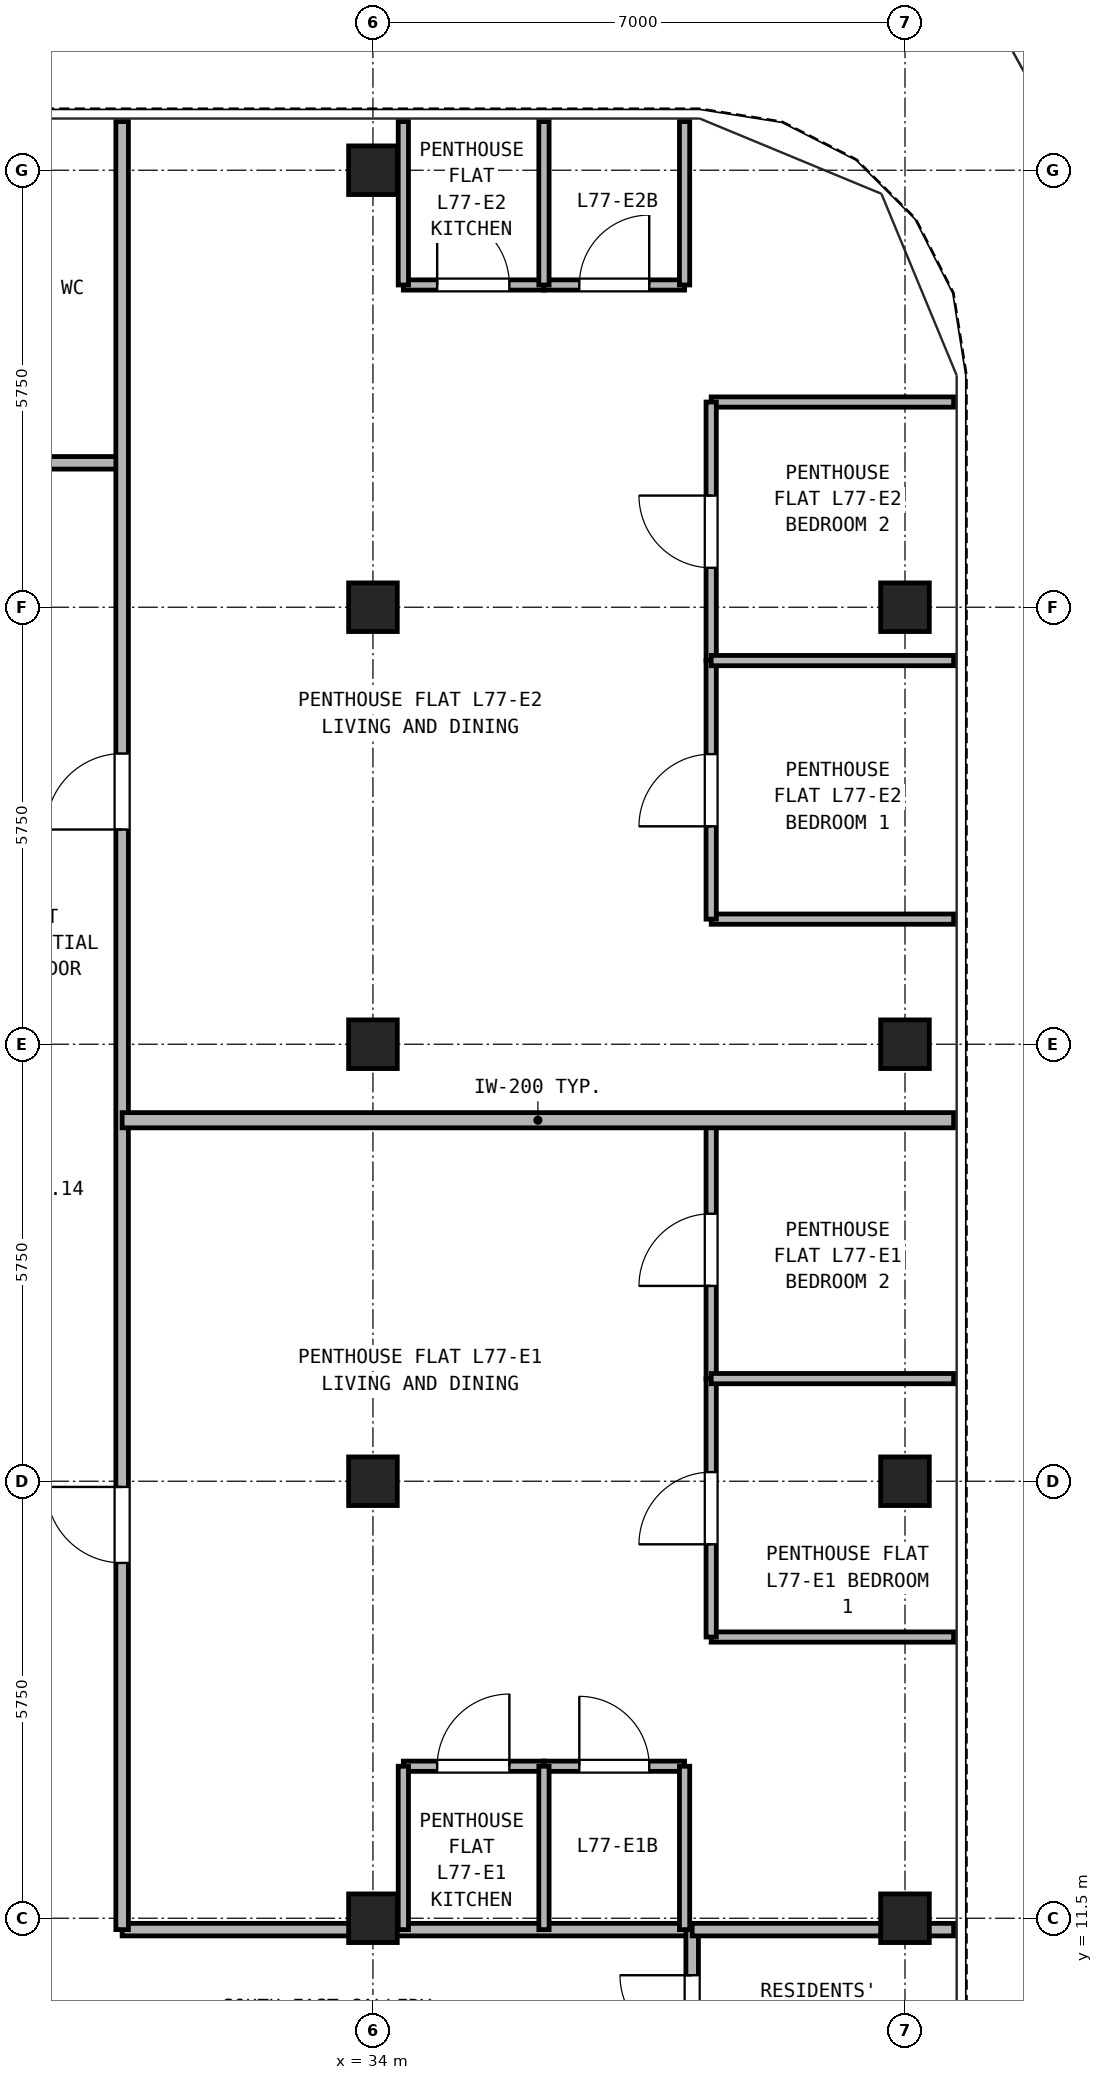
"""IFC4 building model, lengths in metres.
Left out: names, types, materials, properties, quantities, classifications, styles, units other than length and angle.
Written with IfcOpenShell. Run it as: python <this file> out.ifc"""

import sys

from ifc_helpers import new_model, si_unit, direction, frame, frame_2d, origin, origin_2d, place, context, subcontext, project, spatial, rectangle, hollow_rectangle, extrude, source, transform, mapped, element, fill, save


model = new_model("IFC4")
c1 = context("Model", 3, precision=1e-05, world=origin(), true_north=direction((0.0, 1.0)))
c2 = subcontext(c1, "Body", "Model", "MODEL_VIEW")
j1 = project(units=[si_unit("LENGTHUNIT", "METRE"), si_unit("PLANEANGLEUNIT", "RADIAN")], contexts=[c1])
p1 = place(None, origin())
s1 = spatial("IfcSite", under=j1, at=p1, CompositionType="ELEMENT")
p2 = place(p1, origin())
s2 = spatial("IfcBuilding", under=s1, at=p2, CompositionType="ELEMENT")
p3 = place(p2, frame((0.0, 0.0, 268.1)))
s3 = spatial("IfcBuildingStorey", under=s2, at=p3, CompositionType="ELEMENT", Elevation=268.1)
m1 = source(origin(), c2, "Body", "SweptSolid", [
    extrude(hollow_rectangle(XDim=0.64, YDim=0.64, WallThickness=0.035, at=origin_2d()), origin(), (0.0, 0.0, 1.0), 2.98),
])
for number, where, z_axis, x_axis in (
    (1, (34.0, 34.5, 0.0), (0.0, 0.0, 1.0), (1.0, 0.0, 0.0)),
    (2, (41.0, 11.5, 0.0), (0.0, 0.0, 1.0), (1.0, 0.0, 0.0)),
    (3, (41.0, 17.25, 0.0), (0.0, 0.0, 1.0), (1.0, 0.0, 0.0)),
    (4, (41.0, 23.0, 0.0), (0.0, 0.0, 1.0), (1.0, 0.0, 0.0)),
    (5, (41.0, 28.75, 0.0), (0.0, 0.0, 1.0), (1.0, 0.0, 0.0)),
    (6, (34.0, 11.5, 0.0), (0.0, 0.0, 1.0), (1.0, 0.0, 0.0)),
    (7, (34.0, 17.25, 0.0), (0.0, 0.0, 1.0), (1.0, 0.0, 0.0)),
    (8, (34.0, 23.0, 0.0), (0.0, 0.0, 1.0), (1.0, 0.0, 0.0)),
    (9, (34.0, 28.75, 0.0), (0.0, 0.0, 1.0), (1.0, 0.0, 0.0)),
):
    element("IfcColumn", number, at=place(p3, frame(where, z_axis=z_axis, x_axis=x_axis)), inside=s3, PredefinedType="COLUMN", context=c2, shape_type="MappedRepresentation", body=[
        mapped(m1, transform((0.0, 0.0, 0.0), x_axis=(1.0, 0.0, 0.0), y_axis=(0.0, 1.0, 0.0), z_axis=(0.0, 0.0, 1.0), scale=1.0)),
    ])
p4 = place(p3, frame((30.7, 11.35, 0.0), z_axis=(0.0, 0.0, 1.0), x_axis=(1.0, 0.0, 0.0)))
e10 = element("IfcWall", 10, at=p4, inside=s3, PredefinedType="PARTITIONING", context=c2, shape_type="SweptSolid", body=[
    extrude(rectangle(XDim=7.5, YDim=0.165, at=frame_2d((3.75, 0.0))), origin(), (0.0, 0.0, 1.0), 2.428),
])
p5 = place(p3, frame((38.2, 9.35, 0.0), z_axis=(0.0, 0.0, 1.0), x_axis=(0.0, 1.0, 0.0)))
e11 = element("IfcWall", 11, at=p5, inside=s3, PredefinedType="PARTITIONING", context=c2, shape_type="SweptSolid", body=[
    extrude(rectangle(XDim=2.0, YDim=0.165, at=frame_2d((1.0, 0.0))), origin(), (0.0, 0.0, 1.0), 2.98),
])
p6 = place(p5, frame((0.45, 0.0, 0.0)))
e12 = element("IfcOpeningElement", 12, at=p6, cuts=e11, PredefinedType="OPENING", context=c2, shape_type="SweptSolid", body=[
    extrude(rectangle(XDim=0.95, YDim=2.15, at=frame_2d((0.475, 1.075))), frame((0.0, 0.093, 0.0), z_axis=(0.0, -1.0, 0.0), x_axis=(1.0, 0.0, 0.0)), (0.0, 0.0, 1.0), 0.185),
])
p7 = place(p3, frame((16.3, 30.65, 0.0), z_axis=(0.0, 0.0, 1.0), x_axis=(1.0, 0.0, 0.0)))
e13 = element("IfcWall", 13, at=p7, inside=s3, PredefinedType="PARTITIONING", context=c2, shape_type="SweptSolid", body=[
    extrude(rectangle(XDim=14.4, YDim=0.165, at=frame_2d((7.2, 0.0))), origin(), (0.0, 0.0, 1.0), 2.98),
])
p8 = place(p7, frame((3.1, 0.0, 0.0)))
e14 = element("IfcOpeningElement", 14, at=p8, cuts=e13, PredefinedType="OPENING", context=c2, shape_type="SweptSolid", body=[
    extrude(rectangle(XDim=0.95, YDim=2.15, at=frame_2d((0.475, 1.075))), frame((0.0, 0.093, 0.0), z_axis=(0.0, -1.0, 0.0), x_axis=(1.0, 0.0, 0.0)), (0.0, 0.0, 1.0), 0.185),
])
p9 = place(p7, frame((8.0, 0.0, 0.0)))
e15 = element("IfcOpeningElement", 15, at=p9, cuts=e13, PredefinedType="OPENING", context=c2, shape_type="SweptSolid", body=[
    extrude(rectangle(XDim=0.95, YDim=2.15, at=frame_2d((0.475, 1.075))), frame((0.0, 0.093, 0.0), z_axis=(0.0, -1.0, 0.0), x_axis=(1.0, 0.0, 0.0)), (0.0, 0.0, 1.0), 0.185),
])
p10 = place(p7, frame((11.6, 0.0, 0.0)))
e16 = element("IfcOpeningElement", 16, at=p10, cuts=e13, PredefinedType="OPENING", context=c2, shape_type="SweptSolid", body=[
    extrude(rectangle(XDim=0.92, YDim=2.1, at=frame_2d((0.46, 1.05))), frame((0.0, 0.093, 0.0), z_axis=(0.0, -1.0, 0.0), x_axis=(1.0, 0.0, 0.0)), (0.0, 0.0, 1.0), 0.185),
])
p11 = place(p3, frame((30.7, 11.35, 0.0), z_axis=(0.0, 0.0, 1.0), x_axis=(0.0, 1.0, 0.0)))
e17 = element("IfcWall", 17, at=p11, inside=s3, PredefinedType="PARTITIONING", context=c2, shape_type="SweptSolid", body=[
    extrude(rectangle(XDim=23.79, YDim=0.165, at=frame_2d((11.895, 0.0))), origin(), (0.0, 0.0, 1.0), 2.98),
])
p12 = place(p11, frame((4.825, 0.0, 0.0)))
e18 = element("IfcOpeningElement", 18, at=p12, cuts=e17, PredefinedType="OPENING", context=c2, shape_type="SweptSolid", body=[
    extrude(rectangle(XDim=1.0, YDim=2.15, at=frame_2d((0.5, 1.075))), frame((0.0, 0.093, 0.0), z_axis=(0.0, -1.0, 0.0), x_axis=(1.0, 0.0, 0.0)), (0.0, 0.0, 1.0), 0.185),
])
p13 = place(p11, frame((14.475, 0.0, 0.0)))
e19 = element("IfcOpeningElement", 19, at=p13, cuts=e17, PredefinedType="OPENING", context=c2, shape_type="SweptSolid", body=[
    extrude(rectangle(XDim=1.0, YDim=2.15, at=frame_2d((0.5, 1.075))), frame((0.0, 0.093, 0.0), z_axis=(0.0, -1.0, 0.0), x_axis=(1.0, 0.0, 0.0)), (0.0, 0.0, 1.0), 0.185),
])
p14 = place(p3, frame((38.2, 11.35, 0.0), z_axis=(0.0, 0.0, 1.0), x_axis=(1.0, 0.0, 0.0)))
e20 = element("IfcWall", 20, at=p14, inside=s3, PredefinedType="PARTITIONING", context=c2, shape_type="SweptSolid", body=[
    extrude(rectangle(XDim=3.44, YDim=0.165, at=frame_2d((1.72, 0.0))), origin(), (0.0, 0.0, 1.0), 2.428),
])
p15 = place(p3, frame((34.4, 13.5, 0.0), z_axis=(0.0, 0.0, 1.0), x_axis=(1.0, 0.0, 0.0)))
e21 = element("IfcWall", 21, at=p15, inside=s3, PredefinedType="PARTITIONING", context=c2, shape_type="SweptSolid", body=[
    extrude(rectangle(XDim=1.85, YDim=0.135, at=frame_2d((0.925, 0.0))), origin(), (0.0, 0.0, 1.0), 2.98),
])
p16 = place(p15, frame((0.445, 0.0, 0.0)))
e22 = element("IfcOpeningElement", 22, at=p16, cuts=e21, PredefinedType="OPENING", context=c2, shape_type="SweptSolid", body=[
    extrude(rectangle(XDim=0.95, YDim=2.15, at=frame_2d((0.475, 1.075))), frame((0.0, 0.077, 0.0), z_axis=(0.0, -1.0, 0.0), x_axis=(1.0, 0.0, 0.0)), (0.0, 0.0, 1.0), 0.155),
])
p17 = place(p3, frame((36.25, 13.5, 0.0), z_axis=(0.0, 0.0, 1.0), x_axis=(1.0, 0.0, 0.0)))
e23 = element("IfcWall", 23, at=p17, inside=s3, PredefinedType="PARTITIONING", context=c2, shape_type="SweptSolid", body=[
    extrude(rectangle(XDim=1.85, YDim=0.135, at=frame_2d((0.925, 0.0))), origin(), (0.0, 0.0, 1.0), 2.98),
])
p18 = place(p17, frame((0.465, 0.0, 0.0)))
e24 = element("IfcOpeningElement", 24, at=p18, cuts=e23, PredefinedType="OPENING", context=c2, shape_type="SweptSolid", body=[
    extrude(rectangle(XDim=0.92, YDim=2.1, at=frame_2d((0.46, 1.05))), frame((0.0, 0.077, 0.0), z_axis=(0.0, -1.0, 0.0), x_axis=(1.0, 0.0, 0.0)), (0.0, 0.0, 1.0), 0.155),
])
for number, where, z_axis, x_axis in (
    (25, (34.4, 11.35, 0.0), (0.0, 0.0, 1.0), (0.0, 1.0, 0.0)),
    (26, (36.25, 11.35, 0.0), (0.0, 0.0, 1.0), (0.0, 1.0, 0.0)),
    (27, (38.1, 11.35, 0.0), (0.0, 0.0, 1.0), (0.0, 1.0, 0.0)),
):
    element("IfcWall", number, at=place(p3, frame(where, z_axis=z_axis, x_axis=x_axis)), inside=s3, PredefinedType="PARTITIONING", context=c2, shape_type="SweptSolid", body=[
        extrude(rectangle(XDim=2.15, YDim=0.135, at=frame_2d((1.075, 0.0))), origin(), (0.0, 0.0, 1.0), 2.98),
    ])
p19 = place(p3, frame((38.45, 15.2, 0.0), z_axis=(0.0, 0.0, 1.0), x_axis=(1.0, 0.0, 0.0)))
e28 = element("IfcWall", 28, at=p19, inside=s3, PredefinedType="PARTITIONING", context=c2, shape_type="SweptSolid", body=[
    extrude(rectangle(XDim=3.19, YDim=0.135, at=frame_2d((1.595, 0.0))), origin(), (0.0, 0.0, 1.0), 2.98),
])
p20 = place(p3, frame((38.45, 15.2, 0.0), z_axis=(0.0, 0.0, 1.0), x_axis=(0.0, 1.0, 0.0)))
e29 = element("IfcWall", 29, at=p20, inside=s3, PredefinedType="PARTITIONING", context=c2, shape_type="SweptSolid", body=[
    extrude(rectangle(XDim=3.4, YDim=0.135, at=frame_2d((1.7, 0.0))), origin(), (0.0, 0.0, 1.0), 2.98),
])
p21 = place(p20, frame((1.22, 0.0, 0.0)))
e30 = element("IfcOpeningElement", 30, at=p21, cuts=e29, PredefinedType="OPENING", context=c2, shape_type="SweptSolid", body=[
    extrude(rectangle(XDim=0.95, YDim=2.15, at=frame_2d((0.475, 1.075))), frame((0.0, 0.077, 0.0), z_axis=(0.0, -1.0, 0.0), x_axis=(1.0, 0.0, 0.0)), (0.0, 0.0, 1.0), 0.155),
])
p22 = place(p3, frame((38.45, 18.6, 0.0), z_axis=(0.0, 0.0, 1.0), x_axis=(0.0, 1.0, 0.0)))
e31 = element("IfcWall", 31, at=p22, inside=s3, PredefinedType="PARTITIONING", context=c2, shape_type="SweptSolid", body=[
    extrude(rectangle(XDim=3.4, YDim=0.135, at=frame_2d((1.7, 0.0))), origin(), (0.0, 0.0, 1.0), 2.98),
])
p23 = place(p22, frame((1.22, 0.0, 0.0)))
e32 = element("IfcOpeningElement", 32, at=p23, cuts=e31, PredefinedType="OPENING", context=c2, shape_type="SweptSolid", body=[
    extrude(rectangle(XDim=0.95, YDim=2.15, at=frame_2d((0.475, 1.075))), frame((0.0, 0.077, 0.0), z_axis=(0.0, -1.0, 0.0), x_axis=(1.0, 0.0, 0.0)), (0.0, 0.0, 1.0), 0.155),
])
p24 = place(p3, frame((38.45, 18.6, 0.0), z_axis=(0.0, 0.0, 1.0), x_axis=(1.0, 0.0, 0.0)))
e33 = element("IfcWall", 33, at=p24, inside=s3, PredefinedType="PARTITIONING", context=c2, shape_type="SweptSolid", body=[
    extrude(rectangle(XDim=3.19, YDim=0.135, at=frame_2d((1.595, 0.0))), origin(), (0.0, 0.0, 1.0), 2.98),
])
p25 = place(p3, frame((30.7, 22.0, 0.0), z_axis=(0.0, 0.0, 1.0), x_axis=(1.0, 0.0, 0.0)))
e34 = element("IfcWall", 34, at=p25, inside=s3, PredefinedType="PARTITIONING", context=c2, shape_type="SweptSolid", body=[
    extrude(rectangle(XDim=10.94, YDim=0.2, at=frame_2d((5.47, 0.0))), origin(), (0.0, 0.0, 1.0), 2.98),
])
p26 = place(p3, frame((34.4, 32.99, 0.0), z_axis=(0.0, 0.0, 1.0), x_axis=(1.0, 0.0, 0.0)))
e35 = element("IfcWall", 35, at=p26, inside=s3, PredefinedType="PARTITIONING", context=c2, shape_type="SweptSolid", body=[
    extrude(rectangle(XDim=1.85, YDim=0.135, at=frame_2d((0.925, 0.0))), origin(), (0.0, 0.0, 1.0), 2.98),
])
p27 = place(p26, frame((0.445, 0.0, 0.0)))
e36 = element("IfcOpeningElement", 36, at=p27, cuts=e35, PredefinedType="OPENING", context=c2, shape_type="SweptSolid", body=[
    extrude(rectangle(XDim=0.95, YDim=2.15, at=frame_2d((0.475, 1.075))), frame((0.0, 0.077, 0.0), z_axis=(0.0, -1.0, 0.0), x_axis=(1.0, 0.0, 0.0)), (0.0, 0.0, 1.0), 0.155),
])
p28 = place(p3, frame((36.25, 32.99, 0.0), z_axis=(0.0, 0.0, 1.0), x_axis=(1.0, 0.0, 0.0)))
e37 = element("IfcWall", 37, at=p28, inside=s3, PredefinedType="PARTITIONING", context=c2, shape_type="SweptSolid", body=[
    extrude(rectangle(XDim=1.85, YDim=0.135, at=frame_2d((0.925, 0.0))), origin(), (0.0, 0.0, 1.0), 2.98),
])
p29 = place(p28, frame((0.465, 0.0, 0.0)))
e38 = element("IfcOpeningElement", 38, at=p29, cuts=e37, PredefinedType="OPENING", context=c2, shape_type="SweptSolid", body=[
    extrude(rectangle(XDim=0.92, YDim=2.1, at=frame_2d((0.46, 1.05))), frame((0.0, 0.077, 0.0), z_axis=(0.0, -1.0, 0.0), x_axis=(1.0, 0.0, 0.0)), (0.0, 0.0, 1.0), 0.155),
])
for number, where, z_axis, x_axis in (
    (39, (34.4, 32.99, 0.0), (0.0, 0.0, 1.0), (0.0, 1.0, 0.0)),
    (40, (36.25, 32.99, 0.0), (0.0, 0.0, 1.0), (0.0, 1.0, 0.0)),
    (41, (38.1, 32.99, 0.0), (0.0, 0.0, 1.0), (0.0, 1.0, 0.0)),
):
    element("IfcWall", number, at=place(p3, frame(where, z_axis=z_axis, x_axis=x_axis)), inside=s3, PredefinedType="PARTITIONING", context=c2, shape_type="SweptSolid", body=[
        extrude(rectangle(XDim=2.15, YDim=0.135, at=frame_2d((1.075, 0.0))), origin(), (0.0, 0.0, 1.0), 2.98),
    ])
for number, where, z_axis, x_axis in (
    (42, (38.45, 24.646, 0.0), (0.0, 0.0, 1.0), (1.0, 0.0, 0.0)),
    (43, (38.45, 31.45, 0.0), (0.0, 0.0, 1.0), (1.0, 0.0, 0.0)),
):
    element("IfcWall", number, at=place(p3, frame(where, z_axis=z_axis, x_axis=x_axis)), inside=s3, PredefinedType="PARTITIONING", context=c2, shape_type="SweptSolid", body=[
        extrude(rectangle(XDim=3.19, YDim=0.135, at=frame_2d((1.595, 0.0))), origin(), (0.0, 0.0, 1.0), 2.98),
    ])
p30 = place(p3, frame((38.45, 24.646, 0.0), z_axis=(0.0, 0.0, 1.0), x_axis=(0.0, 1.0, 0.0)))
e44 = element("IfcWall", 44, at=p30, inside=s3, PredefinedType="PARTITIONING", context=c2, shape_type="SweptSolid", body=[
    extrude(rectangle(XDim=3.402, YDim=0.135, at=frame_2d((1.701, 0.0))), origin(), (0.0, 0.0, 1.0), 2.98),
])
p31 = place(p30, frame((1.221, 0.0, 0.0)))
e45 = element("IfcOpeningElement", 45, at=p31, cuts=e44, PredefinedType="OPENING", context=c2, shape_type="SweptSolid", body=[
    extrude(rectangle(XDim=0.95, YDim=2.15, at=frame_2d((0.475, 1.075))), frame((0.0, 0.077, 0.0), z_axis=(0.0, -1.0, 0.0), x_axis=(1.0, 0.0, 0.0)), (0.0, 0.0, 1.0), 0.155),
])
p32 = place(p3, frame((38.45, 28.048, 0.0), z_axis=(0.0, 0.0, 1.0), x_axis=(0.0, 1.0, 0.0)))
e46 = element("IfcWall", 46, at=p32, inside=s3, PredefinedType="PARTITIONING", context=c2, shape_type="SweptSolid", body=[
    extrude(rectangle(XDim=3.402, YDim=0.135, at=frame_2d((1.701, 0.0))), origin(), (0.0, 0.0, 1.0), 2.98),
])
p33 = place(p32, frame((1.221, 0.0, 0.0)))
e47 = element("IfcOpeningElement", 47, at=p33, cuts=e46, PredefinedType="OPENING", context=c2, shape_type="SweptSolid", body=[
    extrude(rectangle(XDim=0.95, YDim=2.15, at=frame_2d((0.475, 1.075))), frame((0.0, 0.077, 0.0), z_axis=(0.0, -1.0, 0.0), x_axis=(1.0, 0.0, 0.0)), (0.0, 0.0, 1.0), 0.155),
])
p34 = place(p3, frame((38.45, 28.048, 0.0), z_axis=(0.0, 0.0, 1.0), x_axis=(1.0, 0.0, 0.0)))
e48 = element("IfcWall", 48, at=p34, inside=s3, PredefinedType="PARTITIONING", context=c2, shape_type="SweptSolid", body=[
    extrude(rectangle(XDim=3.19, YDim=0.135, at=frame_2d((1.595, 0.0))), origin(), (0.0, 0.0, 1.0), 2.98),
])
p35 = place(p6, origin())
e49 = element("IfcDoor", 49, at=p35, inside=s3, OperationType="SINGLE_SWING_RIGHT", PredefinedType="DOOR", context=c2, shape_type="SweptSolid", body=[
    extrude(rectangle(XDim=0.95, YDim=2.15, at=frame_2d((0.475, 1.075))), frame((0.0, 0.025, 0.0), z_axis=(0.0, -1.0, 0.0), x_axis=(1.0, 0.0, 0.0)), (0.0, 0.0, 1.0), 0.05),
])
fill(e12, e49)
p36 = place(p16, origin())
e50 = element("IfcDoor", 50, at=p36, inside=s3, OperationType="SINGLE_SWING_RIGHT", PredefinedType="DOOR", context=c2, shape_type="SweptSolid", body=[
    extrude(rectangle(XDim=0.95, YDim=2.15, at=frame_2d((0.475, 1.075))), frame((0.0, 0.025, 0.0), z_axis=(0.0, -1.0, 0.0), x_axis=(1.0, 0.0, 0.0)), (0.0, 0.0, 1.0), 0.05),
])
fill(e22, e50)
p37 = place(p18, origin())
e51 = element("IfcDoor", 51, at=p37, inside=s3, OperationType="SINGLE_SWING_LEFT", PredefinedType="DOOR", context=c2, shape_type="SweptSolid", body=[
    extrude(rectangle(XDim=0.92, YDim=2.1, at=frame_2d((0.46, 1.05))), frame((0.0, 0.025, 0.0), z_axis=(0.0, -1.0, 0.0), x_axis=(1.0, 0.0, 0.0)), (0.0, 0.0, 1.0), 0.05),
])
fill(e24, e51)
p38 = place(p21, frame((0.95, 0.0, 0.0), z_axis=(0.0, 0.0, 1.0), x_axis=(-1.0, 0.0, 0.0)))
e52 = element("IfcDoor", 52, at=p38, inside=s3, OperationType="SINGLE_SWING_LEFT", PredefinedType="DOOR", context=c2, shape_type="SweptSolid", body=[
    extrude(rectangle(XDim=0.95, YDim=2.15, at=frame_2d((0.475, 1.075))), frame((0.0, 0.025, 0.0), z_axis=(0.0, -1.0, 0.0), x_axis=(1.0, 0.0, 0.0)), (0.0, 0.0, 1.0), 0.05),
])
fill(e30, e52)
p39 = place(p23, frame((0.95, 0.0, 0.0), z_axis=(0.0, 0.0, 1.0), x_axis=(-1.0, 0.0, 0.0)))
e53 = element("IfcDoor", 53, at=p39, inside=s3, OperationType="SINGLE_SWING_LEFT", PredefinedType="DOOR", context=c2, shape_type="SweptSolid", body=[
    extrude(rectangle(XDim=0.95, YDim=2.15, at=frame_2d((0.475, 1.075))), frame((0.0, 0.025, 0.0), z_axis=(0.0, -1.0, 0.0), x_axis=(1.0, 0.0, 0.0)), (0.0, 0.0, 1.0), 0.05),
])
fill(e32, e53)
p40 = place(p12, frame((1.0, 0.0, 0.0), z_axis=(0.0, 0.0, 1.0), x_axis=(-1.0, 0.0, 0.0)))
e54 = element("IfcDoor", 54, at=p40, inside=s3, OperationType="SINGLE_SWING_RIGHT", PredefinedType="DOOR", context=c2, shape_type="SweptSolid", body=[
    extrude(rectangle(XDim=1.0, YDim=2.15, at=frame_2d((0.5, 1.075))), frame((0.0, 0.025, 0.0), z_axis=(0.0, -1.0, 0.0), x_axis=(1.0, 0.0, 0.0)), (0.0, 0.0, 1.0), 0.05),
])
fill(e18, e54)
p41 = place(p27, frame((0.95, 0.0, 0.0), z_axis=(0.0, 0.0, 1.0), x_axis=(-1.0, 0.0, 0.0)))
e55 = element("IfcDoor", 55, at=p41, inside=s3, OperationType="SINGLE_SWING_LEFT", PredefinedType="DOOR", context=c2, shape_type="SweptSolid", body=[
    extrude(rectangle(XDim=0.95, YDim=2.15, at=frame_2d((0.475, 1.075))), frame((0.0, 0.025, 0.0), z_axis=(0.0, -1.0, 0.0), x_axis=(1.0, 0.0, 0.0)), (0.0, 0.0, 1.0), 0.05),
])
fill(e36, e55)
p42 = place(p29, frame((0.92, 0.0, 0.0), z_axis=(0.0, 0.0, 1.0), x_axis=(-1.0, 0.0, 0.0)))
e56 = element("IfcDoor", 56, at=p42, inside=s3, OperationType="SINGLE_SWING_RIGHT", PredefinedType="DOOR", context=c2, shape_type="SweptSolid", body=[
    extrude(rectangle(XDim=0.92, YDim=2.1, at=frame_2d((0.46, 1.05))), frame((0.0, 0.025, 0.0), z_axis=(0.0, -1.0, 0.0), x_axis=(1.0, 0.0, 0.0)), (0.0, 0.0, 1.0), 0.05),
])
fill(e38, e56)
p43 = place(p31, frame((0.95, 0.0, 0.0), z_axis=(0.0, 0.0, 1.0), x_axis=(-1.0, 0.0, 0.0)))
e57 = element("IfcDoor", 57, at=p43, inside=s3, OperationType="SINGLE_SWING_LEFT", PredefinedType="DOOR", context=c2, shape_type="SweptSolid", body=[
    extrude(rectangle(XDim=0.95, YDim=2.15, at=frame_2d((0.475, 1.075))), frame((0.0, 0.025, 0.0), z_axis=(0.0, -1.0, 0.0), x_axis=(1.0, 0.0, 0.0)), (0.0, 0.0, 1.0), 0.05),
])
fill(e45, e57)
p44 = place(p33, frame((0.95, 0.0, 0.0), z_axis=(0.0, 0.0, 1.0), x_axis=(-1.0, 0.0, 0.0)))
e58 = element("IfcDoor", 58, at=p44, inside=s3, OperationType="SINGLE_SWING_RIGHT", PredefinedType="DOOR", context=c2, shape_type="SweptSolid", body=[
    extrude(rectangle(XDim=0.95, YDim=2.15, at=frame_2d((0.475, 1.075))), frame((0.0, 0.025, 0.0), z_axis=(0.0, -1.0, 0.0), x_axis=(1.0, 0.0, 0.0)), (0.0, 0.0, 1.0), 0.05),
])
fill(e47, e58)
p45 = place(p13, frame((1.0, 0.0, 0.0), z_axis=(0.0, 0.0, 1.0), x_axis=(-1.0, 0.0, 0.0)))
e59 = element("IfcDoor", 59, at=p45, inside=s3, OperationType="SINGLE_SWING_LEFT", PredefinedType="DOOR", context=c2, shape_type="SweptSolid", body=[
    extrude(rectangle(XDim=1.0, YDim=2.15, at=frame_2d((0.5, 1.075))), frame((0.0, 0.025, 0.0), z_axis=(0.0, -1.0, 0.0), x_axis=(1.0, 0.0, 0.0)), (0.0, 0.0, 1.0), 0.05),
])
fill(e19, e59)
save(model, sys.argv[1])
